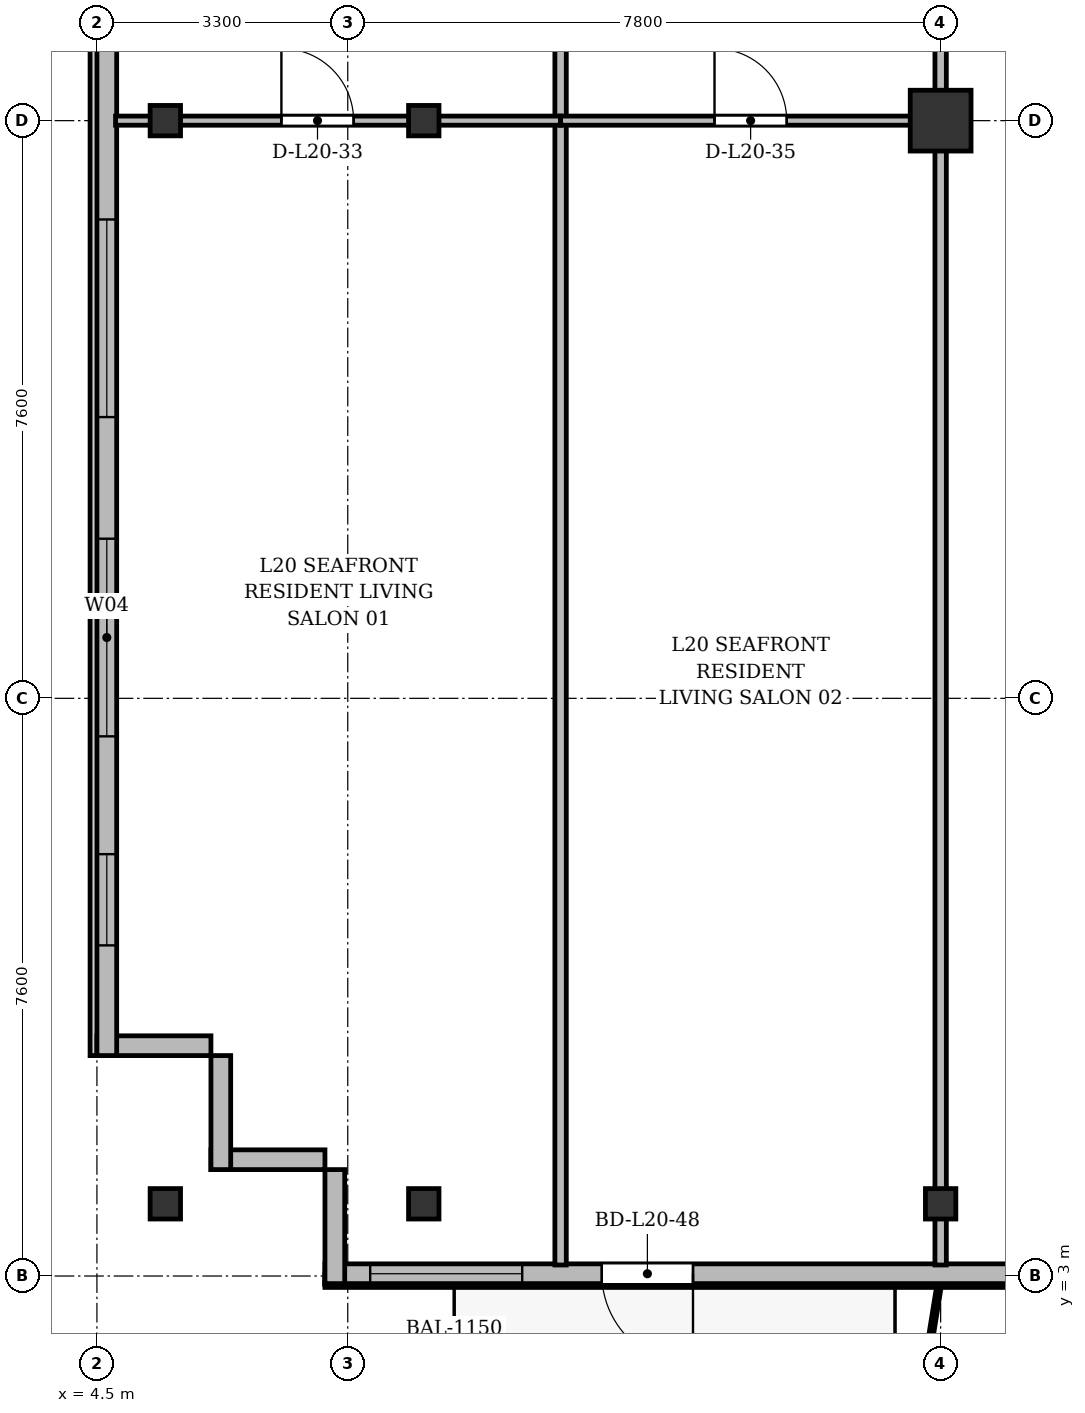
"""IFC4 building model, lengths in metres.
Left out: names, types, materials, properties, quantities, classifications, styles, units other than length and angle.
Written with IfcOpenShell. Run it as: python <this file> out.ifc"""

import sys

from ifc_helpers import new_model, si_unit, direction, frame, frame_2d, origin, origin_2d, place, context, subcontext, project, spatial, rectangle, i_section, extrude, source, transform, mapped, element, fill, save


model = new_model("IFC4")
c1 = context("Model", 3, precision=1e-05, world=origin(), true_north=direction((0.0, 1.0)))
c2 = subcontext(c1, "Body", "Model", "MODEL_VIEW")
j1 = project(units=[si_unit("LENGTHUNIT", "METRE"), si_unit("PLANEANGLEUNIT", "RADIAN")], contexts=[c1])
p1 = place(None, origin())
s1 = spatial("IfcSite", under=j1, at=p1, CompositionType="ELEMENT")
p2 = place(p1, origin())
s2 = spatial("IfcBuilding", under=s1, at=p2, CompositionType="ELEMENT")
p3 = place(p2, frame((0.0, 0.0, 81.7)))
s3 = spatial("IfcBuildingStorey", under=s2, at=p3, CompositionType="ELEMENT", Elevation=81.7)
m1 = source(origin(), c2, "Body", "SweptSolid", [
    extrude(i_section(OverallWidth=0.4, OverallDepth=0.4, WebThickness=0.022, FlangeThickness=0.035, at=origin_2d()), origin(), (0.0, 0.0, 1.0), 3.6),
])
for number, where, z_axis, x_axis in (
    (1, (5.4, 3.95, 0.0), (0.0, 0.0, 1.0), (1.0, 0.0, 0.0)),
    (2, (5.4, 18.2, 0.0), (0.0, 0.0, 1.0), (1.0, 0.0, 0.0)),
    (3, (8.8, 3.95, 0.0), (0.0, 0.0, 1.0), (1.0, 0.0, 0.0)),
    (4, (8.8, 18.2, 0.0), (0.0, 0.0, 1.0), (1.0, 0.0, 0.0)),
    (5, (15.6, 3.95, 0.0), (0.0, 0.0, 1.0), (1.0, 0.0, 0.0)),
):
    element("IfcColumn", number, at=place(p3, frame(where, z_axis=z_axis, x_axis=x_axis)), inside=s3, PredefinedType="COLUMN", context=c2, shape_type="MappedRepresentation", body=[
        mapped(m1, transform((0.0, 0.0, 0.0), x_axis=(1.0, 0.0, 0.0), y_axis=(0.0, 1.0, 0.0), z_axis=(0.0, 0.0, 1.0), scale=1.0)),
    ])
m2 = source(origin(), c2, "Body", "SweptSolid", [
    extrude(rectangle(XDim=0.8, YDim=0.8, at=origin_2d()), origin(), (0.0, 0.0, 1.0), 3.6),
])
p4 = place(p3, frame((15.6, 18.2, 0.0), z_axis=(0.0, 0.0, 1.0), x_axis=(1.0, 0.0, 0.0)))
e6 = element("IfcColumn", 6, at=p4, inside=s3, PredefinedType="COLUMN", context=c2, shape_type="MappedRepresentation", body=[
    mapped(m2, transform((0.0, 0.0, 0.0), x_axis=(1.0, 0.0, 0.0), y_axis=(0.0, 1.0, 0.0), z_axis=(0.0, 0.0, 1.0), scale=1.0)),
])
for number, where, z_axis, x_axis in (
    (7, (7.5, 4.53, 0.0), (0.0, 0.0, 1.0), (-1.0, 0.0, 0.0)),
    (8, (6.13, 4.4, 0.0), (0.0, 0.0, 1.0), (0.0, 1.0, 0.0)),
):
    element("IfcWall", number, at=place(p3, frame(where, z_axis=z_axis, x_axis=x_axis)), inside=s3, PredefinedType="SOLIDWALL", context=c2, shape_type="SweptSolid", body=[
        extrude(rectangle(XDim=1.5, YDim=0.26, at=frame_2d((0.75, 0.0))), origin(), (0.0, 0.0, 1.0), 3.34),
    ])
p5 = place(p3, frame((6.0, 6.03, 0.0), z_axis=(0.0, 0.0, 1.0), x_axis=(-1.0, 0.0, 0.0)))
e9 = element("IfcWall", 9, at=p5, inside=s3, PredefinedType="SOLIDWALL", context=c2, shape_type="SweptSolid", body=[
    extrude(rectangle(XDim=1.5, YDim=0.26, at=frame_2d((0.75, 0.0))), origin(), (0.0, 0.0, 1.0), 2.84),
])
p6 = place(p3, frame((4.63, 5.9, 0.0), z_axis=(0.0, 0.0, 1.0), x_axis=(0.0, 1.0, 0.0)))
e10 = element("IfcWall", 10, at=p6, inside=s3, PredefinedType="SOLIDWALL", context=c2, shape_type="SweptSolid", body=[
    extrude(rectangle(XDim=39.6, YDim=0.26, at=frame_2d((19.8, 0.0))), origin(), (0.0, 0.0, 1.0), 3.34),
])
p7 = place(p6, frame((1.45, 0.0, 0.92)))
e11 = element("IfcOpeningElement", 11, at=p7, cuts=e10, PredefinedType="OPENING", context=c2, shape_type="SweptSolid", body=[
    extrude(rectangle(XDim=1.2, YDim=1.65, at=frame_2d((0.6, 0.825))), frame((0.0, 0.14, 0.0), z_axis=(0.0, -1.0, 0.0), x_axis=(1.0, 0.0, 0.0)), (0.0, 0.0, 1.0), 0.28),
])
p8 = place(p6, frame((4.2, 0.0, 0.92)))
e12 = element("IfcOpeningElement", 12, at=p8, cuts=e10, PredefinedType="OPENING", context=c2, shape_type="SweptSolid", body=[
    extrude(rectangle(XDim=2.6, YDim=1.9, at=frame_2d((1.3, 0.95))), frame((0.0, 0.14, 0.0), z_axis=(0.0, -1.0, 0.0), x_axis=(1.0, 0.0, 0.0)), (0.0, 0.0, 1.0), 0.28),
])
p9 = place(p6, frame((8.4, 0.0, 0.92)))
e13 = element("IfcOpeningElement", 13, at=p9, cuts=e10, PredefinedType="OPENING", context=c2, shape_type="SweptSolid", body=[
    extrude(rectangle(XDim=2.6, YDim=1.9, at=frame_2d((1.3, 0.95))), frame((0.0, 0.14, 0.0), z_axis=(0.0, -1.0, 0.0), x_axis=(1.0, 0.0, 0.0)), (0.0, 0.0, 1.0), 0.28),
])
p10 = place(p6, frame((15.6, 0.0, 0.92)))
e14 = element("IfcOpeningElement", 14, at=p10, cuts=e10, PredefinedType="OPENING", context=c2, shape_type="SweptSolid", body=[
    extrude(rectangle(XDim=2.6, YDim=1.9, at=frame_2d((1.3, 0.95))), frame((0.0, 0.14, 0.0), z_axis=(0.0, -1.0, 0.0), x_axis=(1.0, 0.0, 0.0)), (0.0, 0.0, 1.0), 0.28),
])
p11 = place(p6, frame((29.6, 0.0, 0.92)))
e15 = element("IfcOpeningElement", 15, at=p11, cuts=e10, PredefinedType="OPENING", context=c2, shape_type="SweptSolid", body=[
    extrude(rectangle(XDim=2.6, YDim=1.9, at=frame_2d((1.3, 0.95))), frame((0.0, 0.14, 0.0), z_axis=(0.0, -1.0, 0.0), x_axis=(1.0, 0.0, 0.0)), (0.0, 0.0, 1.0), 0.28),
])
p12 = place(p6, frame((37.25, 0.0, 0.92)))
e16 = element("IfcOpeningElement", 16, at=p12, cuts=e10, PredefinedType="OPENING", context=c2, shape_type="SweptSolid", body=[
    extrude(rectangle(XDim=1.2, YDim=1.65, at=frame_2d((0.6, 0.825))), frame((0.0, 0.14, 0.0), z_axis=(0.0, -1.0, 0.0), x_axis=(1.0, 0.0, 0.0)), (0.0, 0.0, 1.0), 0.28),
])
p13 = place(p3, frame((66.9, 3.03, 0.0), z_axis=(0.0, 0.0, 1.0), x_axis=(-1.0, 0.0, 0.0)))
e17 = element("IfcWall", 17, at=p13, inside=s3, PredefinedType="SOLIDWALL", context=c2, shape_type="SweptSolid", body=[
    extrude(rectangle(XDim=59.4, YDim=0.26, at=frame_2d((29.7, 0.0))), origin(), (0.0, 0.0, 1.0), 3.34),
])
p14 = place(p13, frame((0.795, 0.0, 0.9)))
e18 = element("IfcOpeningElement", 18, at=p14, cuts=e17, PredefinedType="OPENING", context=c2, shape_type="SweptSolid", body=[
    extrude(rectangle(XDim=1.8, YDim=1.8, at=frame_2d((0.9, 0.9))), frame((0.0, 0.14, 0.0), z_axis=(0.0, -1.0, 0.0), x_axis=(1.0, 0.0, 0.0)), (0.0, 0.0, 1.0), 0.28),
])
p15 = place(p13, frame((4.6, 0.0, 0.9)))
e19 = element("IfcOpeningElement", 19, at=p15, cuts=e17, PredefinedType="OPENING", context=c2, shape_type="SweptSolid", body=[
    extrude(rectangle(XDim=2.2, YDim=1.8, at=frame_2d((1.1, 0.9))), frame((0.0, 0.14, 0.0), z_axis=(0.0, -1.0, 0.0), x_axis=(1.0, 0.0, 0.0)), (0.0, 0.0, 1.0), 0.28),
])
p16 = place(p13, frame((9.18, 0.0, 0.0)))
e20 = element("IfcOpeningElement", 20, at=p16, cuts=e17, PredefinedType="OPENING", context=c2, shape_type="SweptSolid", body=[
    extrude(rectangle(XDim=1.2, YDim=2.2, at=frame_2d((0.6, 1.1))), frame((0.0, 0.14, 0.0), z_axis=(0.0, -1.0, 0.0), x_axis=(1.0, 0.0, 0.0)), (0.0, 0.0, 1.0), 0.28),
])
p17 = place(p13, frame((12.95, 0.0, 0.9)))
e21 = element("IfcOpeningElement", 21, at=p17, cuts=e17, PredefinedType="OPENING", context=c2, shape_type="SweptSolid", body=[
    extrude(rectangle(XDim=2.0, YDim=1.95, at=frame_2d((1.0, 0.975))), frame((0.0, 0.14, 0.0), z_axis=(0.0, -1.0, 0.0), x_axis=(1.0, 0.0, 0.0)), (0.0, 0.0, 1.0), 0.28),
])
p18 = place(p13, frame((16.275, 0.0, 0.9)))
e22 = element("IfcOpeningElement", 22, at=p18, cuts=e17, PredefinedType="OPENING", context=c2, shape_type="SweptSolid", body=[
    extrude(rectangle(XDim=1.65, YDim=1.85, at=frame_2d((0.825, 0.925))), frame((0.0, 0.14, 0.0), z_axis=(0.0, -1.0, 0.0), x_axis=(1.0, 0.0, 0.0)), (0.0, 0.0, 1.0), 0.28),
])
p19 = place(p13, frame((18.6, 0.0, 0.9)))
e23 = element("IfcOpeningElement", 23, at=p19, cuts=e17, PredefinedType="OPENING", context=c2, shape_type="SweptSolid", body=[
    extrude(rectangle(XDim=1.8, YDim=1.8, at=frame_2d((0.9, 0.9))), frame((0.0, 0.14, 0.0), z_axis=(0.0, -1.0, 0.0), x_axis=(1.0, 0.0, 0.0)), (0.0, 0.0, 1.0), 0.28),
])
p20 = place(p13, frame((21.15, 0.0, 0.9)))
e24 = element("IfcOpeningElement", 24, at=p20, cuts=e17, PredefinedType="OPENING", context=c2, shape_type="SweptSolid", body=[
    extrude(rectangle(XDim=1.5, YDim=1.75, at=frame_2d((0.75, 0.875))), frame((0.0, 0.14, 0.0), z_axis=(0.0, -1.0, 0.0), x_axis=(1.0, 0.0, 0.0)), (0.0, 0.0, 1.0), 0.28),
])
p21 = place(p13, frame((24.1, 0.0, 0.9)))
e25 = element("IfcOpeningElement", 25, at=p21, cuts=e17, PredefinedType="OPENING", context=c2, shape_type="SweptSolid", body=[
    extrude(rectangle(XDim=1.5, YDim=1.75, at=frame_2d((0.75, 0.875))), frame((0.0, 0.14, 0.0), z_axis=(0.0, -1.0, 0.0), x_axis=(1.0, 0.0, 0.0)), (0.0, 0.0, 1.0), 0.28),
])
p22 = place(p13, frame((27.35, 0.0, 0.9)))
e26 = element("IfcOpeningElement", 26, at=p22, cuts=e17, PredefinedType="OPENING", context=c2, shape_type="SweptSolid", body=[
    extrude(rectangle(XDim=2.0, YDim=1.95, at=frame_2d((1.0, 0.975))), frame((0.0, 0.14, 0.0), z_axis=(0.0, -1.0, 0.0), x_axis=(1.0, 0.0, 0.0)), (0.0, 0.0, 1.0), 0.28),
])
p23 = place(p13, frame((32.375, 0.0, 0.9)))
e27 = element("IfcOpeningElement", 27, at=p23, cuts=e17, PredefinedType="OPENING", context=c2, shape_type="SweptSolid", body=[
    extrude(rectangle(XDim=1.65, YDim=1.85, at=frame_2d((0.825, 0.925))), frame((0.0, 0.14, 0.0), z_axis=(0.0, -1.0, 0.0), x_axis=(1.0, 0.0, 0.0)), (0.0, 0.0, 1.0), 0.28),
])
p24 = place(p13, frame((40.301, 0.0, 0.0)))
e28 = element("IfcOpeningElement", 28, at=p24, cuts=e17, PredefinedType="OPENING", context=c2, shape_type="SweptSolid", body=[
    extrude(rectangle(XDim=1.2, YDim=2.2, at=frame_2d((0.6, 1.1))), frame((0.0, 0.14, 0.0), z_axis=(0.0, -1.0, 0.0), x_axis=(1.0, 0.0, 0.0)), (0.0, 0.0, 1.0), 0.28),
])
p25 = place(p13, frame((46.3, 0.0, 0.9)))
e29 = element("IfcOpeningElement", 29, at=p25, cuts=e17, PredefinedType="OPENING", context=c2, shape_type="SweptSolid", body=[
    extrude(rectangle(XDim=2.2, YDim=1.8, at=frame_2d((1.1, 0.9))), frame((0.0, 0.14, 0.0), z_axis=(0.0, -1.0, 0.0), x_axis=(1.0, 0.0, 0.0)), (0.0, 0.0, 1.0), 0.28),
])
p26 = place(p13, frame((54.558, 0.0, 0.0)))
e30 = element("IfcOpeningElement", 30, at=p26, cuts=e17, PredefinedType="OPENING", context=c2, shape_type="SweptSolid", body=[
    extrude(rectangle(XDim=1.2, YDim=2.2, at=frame_2d((0.6, 1.1))), frame((0.0, 0.14, 0.0), z_axis=(0.0, -1.0, 0.0), x_axis=(1.0, 0.0, 0.0)), (0.0, 0.0, 1.0), 0.28),
])
p27 = place(p13, frame((56.805, 0.0, 0.9)))
e31 = element("IfcOpeningElement", 31, at=p27, cuts=e17, PredefinedType="OPENING", context=c2, shape_type="SweptSolid", body=[
    extrude(rectangle(XDim=2.0, YDim=1.95, at=frame_2d((1.0, 0.975))), frame((0.0, 0.14, 0.0), z_axis=(0.0, -1.0, 0.0), x_axis=(1.0, 0.0, 0.0)), (0.0, 0.0, 1.0), 0.28),
])
p28 = place(p3, frame((7.63, 2.9, 0.0), z_axis=(0.0, 0.0, 1.0), x_axis=(0.0, 1.0, 0.0)))
e32 = element("IfcWall", 32, at=p28, inside=s3, PredefinedType="SOLIDWALL", context=c2, shape_type="SweptSolid", body=[
    extrude(rectangle(XDim=1.5, YDim=0.26, at=frame_2d((0.75, 0.0))), origin(), (0.0, 0.0, 1.0), 2.752),
])
p29 = place(p3, frame((10.6, 3.145, 0.0), z_axis=(0.0, 0.0, 1.0), x_axis=(0.0, 1.0, 0.0)))
e33 = element("IfcWall", 33, at=p29, inside=s3, PredefinedType="PARTITIONING", context=c2, shape_type="SweptSolid", body=[
    extrude(rectangle(XDim=24.455, YDim=0.15, at=frame_2d((12.228, 0.0))), origin(), (0.0, 0.0, 1.0), 2.752),
])
p30 = place(p3, frame((15.6, 3.145, 0.0), z_axis=(0.0, 0.0, 1.0), x_axis=(0.0, 1.0, 0.0)))
e34 = element("IfcWall", 34, at=p30, inside=s3, PredefinedType="PARTITIONING", context=c2, shape_type="SweptSolid", body=[
    extrude(rectangle(XDim=24.455, YDim=0.15, at=frame_2d((12.228, 0.0))), origin(), (0.0, 0.0, 1.0), 2.84),
])
p31 = place(p3, frame((4.745, 18.2, 0.0), z_axis=(0.0, 0.0, 1.0), x_axis=(1.0, 0.0, 0.0)))
e35 = element("IfcWall", 35, at=p31, inside=s3, PredefinedType="PARTITIONING", context=c2, shape_type="SweptSolid", body=[
    extrude(rectangle(XDim=5.855, YDim=0.12, at=frame_2d((2.927, 0.0))), origin(), (0.0, 0.0, 1.0), 2.752),
])
p32 = place(p31, frame((2.182, 0.0, 0.0)))
e36 = element("IfcOpeningElement", 36, at=p32, cuts=e35, PredefinedType="OPENING", context=c2, shape_type="SweptSolid", body=[
    extrude(rectangle(XDim=0.95, YDim=2.15, at=frame_2d((0.475, 1.075))), frame((0.0, 0.07, 0.0), z_axis=(0.0, -1.0, 0.0), x_axis=(1.0, 0.0, 0.0)), (0.0, 0.0, 1.0), 0.14),
])
p33 = place(p3, frame((10.6, 18.2, 0.0), z_axis=(0.0, 0.0, 1.0), x_axis=(1.0, 0.0, 0.0)))
e37 = element("IfcWall", 37, at=p33, inside=s3, PredefinedType="PARTITIONING", context=c2, shape_type="SweptSolid", body=[
    extrude(rectangle(XDim=5.0, YDim=0.12, at=frame_2d((2.5, 0.0))), origin(), (0.0, 0.0, 1.0), 2.752),
])
p34 = place(p33, frame((2.025, 0.0, 0.0)))
e38 = element("IfcOpeningElement", 38, at=p34, cuts=e37, PredefinedType="OPENING", context=c2, shape_type="SweptSolid", body=[
    extrude(rectangle(XDim=0.95, YDim=2.15, at=frame_2d((0.475, 1.075))), frame((0.0, 0.07, 0.0), z_axis=(0.0, -1.0, 0.0), x_axis=(1.0, 0.0, 0.0)), (0.0, 0.0, 1.0), 0.14),
])
m3 = source(origin(), c2, "Body", "SweptSolid", [
    extrude(rectangle(XDim=1.2, YDim=1.65, at=frame_2d((0.6, 0.825))), frame((0.0, 0.03, 0.0), z_axis=(0.0, -1.0, 0.0), x_axis=(1.0, 0.0, 0.0)), (0.0, 0.0, 1.0), 0.06),
])
p35 = place(p7, origin())
e39 = element("IfcWindow", 39, at=p35, inside=s3, PartitioningType="SINGLE_PANEL", PredefinedType="WINDOW", context=c2, shape_type="MappedRepresentation", body=[
    mapped(m3, transform((0.0, 0.0, 0.0), x_axis=(1.0, 0.0, 0.0), y_axis=(0.0, 1.0, 0.0), z_axis=(0.0, 0.0, 1.0), scale=1.0)),
])
fill(e11, e39)
m4 = source(origin(), c2, "Body", "SweptSolid", [
    extrude(rectangle(XDim=2.6, YDim=1.9, at=frame_2d((1.3, 0.95))), frame((0.0, 0.03, 0.0), z_axis=(0.0, -1.0, 0.0), x_axis=(1.0, 0.0, 0.0)), (0.0, 0.0, 1.0), 0.06),
])
p36 = place(p8, origin())
e40 = element("IfcWindow", 40, at=p36, inside=s3, PartitioningType="SINGLE_PANEL", PredefinedType="WINDOW", context=c2, shape_type="MappedRepresentation", body=[
    mapped(m4, transform((0.0, 0.0, 0.0), x_axis=(1.0, 0.0, 0.0), y_axis=(0.0, 1.0, 0.0), z_axis=(0.0, 0.0, 1.0), scale=1.0)),
])
fill(e12, e40)
p37 = place(p9, origin())
e41 = element("IfcWindow", 41, at=p37, inside=s3, PartitioningType="SINGLE_PANEL", PredefinedType="WINDOW", context=c2, shape_type="MappedRepresentation", body=[
    mapped(m4, transform((0.0, 0.0, 0.0), x_axis=(1.0, 0.0, 0.0), y_axis=(0.0, 1.0, 0.0), z_axis=(0.0, 0.0, 1.0), scale=1.0)),
])
fill(e13, e41)
m5 = source(origin(), c2, "Body", "SweptSolid", [
    extrude(rectangle(XDim=1.2, YDim=2.2, at=frame_2d((0.6, 1.1))), frame((0.0, 0.025, 0.0), z_axis=(0.0, -1.0, 0.0), x_axis=(1.0, 0.0, 0.0)), (0.0, 0.0, 1.0), 0.05),
])
p38 = place(p26, origin())
e42 = element("IfcDoor", 42, at=p38, inside=s3, OperationType="SINGLE_SWING_LEFT", PredefinedType="DOOR", context=c2, shape_type="MappedRepresentation", body=[
    mapped(m5, transform((0.0, 0.0, 0.0), x_axis=(1.0, 0.0, 0.0), y_axis=(0.0, 1.0, 0.0), z_axis=(0.0, 0.0, 1.0), scale=1.0)),
])
fill(e30, e42)
m6 = source(origin(), c2, "Body", "SweptSolid", [
    extrude(rectangle(XDim=2.0, YDim=1.95, at=frame_2d((1.0, 0.975))), frame((0.0, 0.03, 0.0), z_axis=(0.0, -1.0, 0.0), x_axis=(1.0, 0.0, 0.0)), (0.0, 0.0, 1.0), 0.06),
])
p39 = place(p27, origin())
e43 = element("IfcWindow", 43, at=p39, inside=s3, PartitioningType="SINGLE_PANEL", PredefinedType="WINDOW", context=c2, shape_type="MappedRepresentation", body=[
    mapped(m6, transform((0.0, 0.0, 0.0), x_axis=(1.0, 0.0, 0.0), y_axis=(0.0, 1.0, 0.0), z_axis=(0.0, 0.0, 1.0), scale=1.0)),
])
fill(e31, e43)
m7 = source(origin(), c2, "Body", "SweptSolid", [
    extrude(rectangle(XDim=0.95, YDim=2.15, at=frame_2d((0.475, 1.075))), frame((0.0, 0.025, 0.0), z_axis=(0.0, -1.0, 0.0), x_axis=(1.0, 0.0, 0.0)), (0.0, 0.0, 1.0), 0.05),
])
p40 = place(p32, origin())
e44 = element("IfcDoor", 44, at=p40, inside=s3, OperationType="SINGLE_SWING_LEFT", PredefinedType="DOOR", context=c2, shape_type="MappedRepresentation", body=[
    mapped(m7, transform((0.0, 0.0, 0.0), x_axis=(1.0, 0.0, 0.0), y_axis=(0.0, 1.0, 0.0), z_axis=(0.0, 0.0, 1.0), scale=1.0)),
])
fill(e36, e44)
p41 = place(p34, origin())
e45 = element("IfcDoor", 45, at=p41, inside=s3, OperationType="SINGLE_SWING_LEFT", PredefinedType="DOOR", context=c2, shape_type="MappedRepresentation", body=[
    mapped(m7, transform((0.0, 0.0, 0.0), x_axis=(1.0, 0.0, 0.0), y_axis=(0.0, 1.0, 0.0), z_axis=(0.0, 0.0, 1.0), scale=1.0)),
])
fill(e38, e45)
save(model, sys.argv[1])
